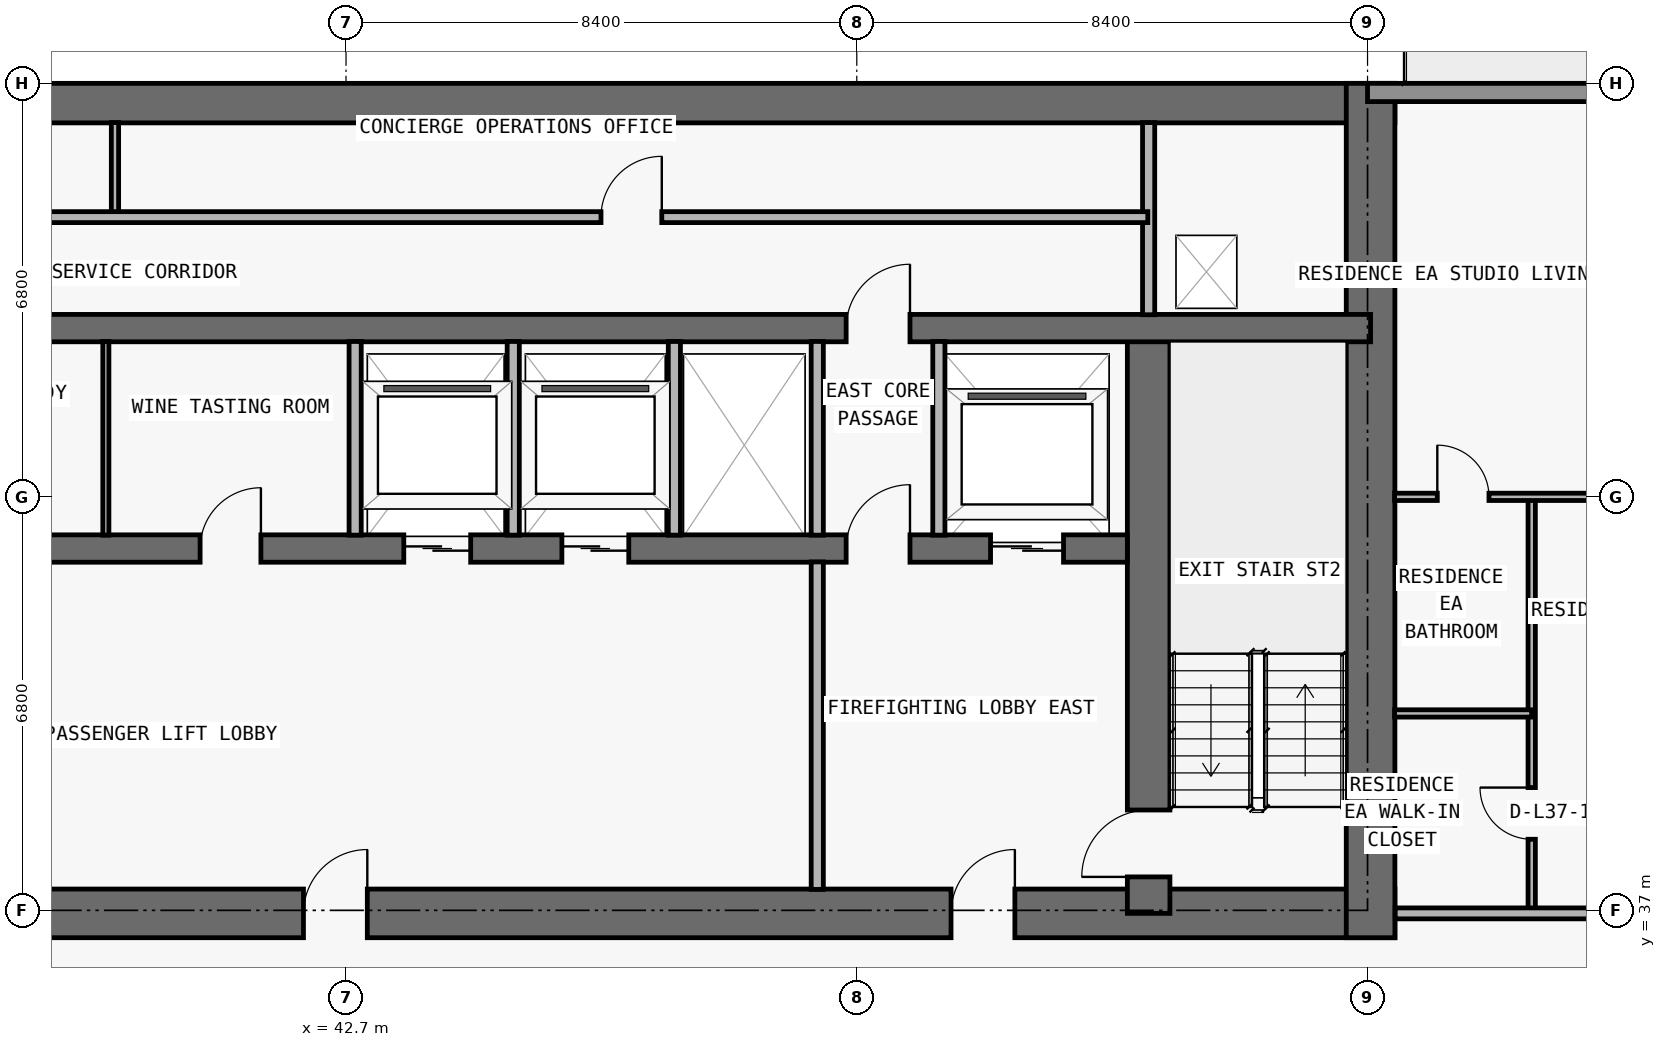
"""IFC4 building model, lengths in metres.
Left out: names, types, materials, properties, quantities, classifications, styles, units other than length and angle.
Written with IfcOpenShell. Run it as: python <this file> out.ifc"""

import sys

from ifc_helpers import new_model, si_unit, direction, frame, frame_2d, origin, place, context, subcontext, project, spatial, rectangle, extrude, element, fill, save


model = new_model("IFC4")
c1 = context("Model", 3, precision=1e-05, world=origin(), true_north=direction((0.0, 1.0)))
c2 = subcontext(c1, "Body", "Model", "MODEL_VIEW")
j1 = project(units=[si_unit("LENGTHUNIT", "METRE"), si_unit("PLANEANGLEUNIT", "RADIAN")], contexts=[c1])
p1 = place(None, origin())
s1 = spatial("IfcSite", under=j1, at=p1, CompositionType="ELEMENT")
p2 = place(p1, origin())
s2 = spatial("IfcBuilding", under=s1, at=p2, CompositionType="ELEMENT")
p3 = place(p2, frame((0.0, 0.0, 135.6)))
s3 = spatial("IfcBuildingStorey", under=s2, at=p3, CompositionType="ELEMENT", Elevation=135.6)
p4 = place(p3, frame((17.85, 36.95, 0.0), z_axis=(0.0, 0.0, 1.0), x_axis=(1.0, 0.0, 0.0)))
e1 = element("IfcWall", 1, at=p4, inside=s3, PredefinedType="SHEAR", context=c2, shape_type="SweptSolid", body=[
    extrude(rectangle(XDim=42.1, YDim=0.8, at=frame_2d((21.05, 0.0))), origin(), (0.0, 0.0, 1.0), 3.05),
])
p5 = place(p4, frame((14.45, 0.0, 0.0)))
e2 = element("IfcOpeningElement", 2, at=p5, cuts=e1, PredefinedType="OPENING", context=c2, shape_type="SweptSolid", body=[
    extrude(rectangle(XDim=1.1, YDim=2.15, at=frame_2d((0.55, 1.075))), frame((0.0, 0.41, 0.0), z_axis=(0.0, -1.0, 0.0), x_axis=(1.0, 0.0, 0.0)), (0.0, 0.0, 1.0), 0.82),
])
p6 = place(p4, frame((6.3, 0.0, 0.0)))
e3 = element("IfcOpeningElement", 3, at=p6, cuts=e1, PredefinedType="OPENING", context=c2, shape_type="SweptSolid", body=[
    extrude(rectangle(XDim=1.05, YDim=2.15, at=frame_2d((0.525, 1.075))), frame((0.0, 0.41, 0.0), z_axis=(0.0, -1.0, 0.0), x_axis=(1.0, 0.0, 0.0)), (0.0, 0.0, 1.0), 0.82),
])
p7 = place(p4, frame((34.8, 0.0, 0.0)))
e4 = element("IfcOpeningElement", 4, at=p7, cuts=e1, PredefinedType="OPENING", context=c2, shape_type="SweptSolid", body=[
    extrude(rectangle(XDim=1.05, YDim=2.15, at=frame_2d((0.525, 1.075))), frame((0.0, 0.41, 0.0), z_axis=(0.0, -1.0, 0.0), x_axis=(1.0, 0.0, 0.0)), (0.0, 0.0, 1.0), 0.82),
])
p8 = place(p4, frame((10.913, 0.0, 0.0)))
e5 = element("IfcOpeningElement", 5, at=p8, cuts=e1, PredefinedType="OPENING", context=c2, shape_type="SweptSolid", body=[
    extrude(rectangle(XDim=1.05, YDim=2.15, at=frame_2d((0.525, 1.075))), frame((0.0, 0.41, 0.0), z_axis=(0.0, -1.0, 0.0), x_axis=(1.0, 0.0, 0.0)), (0.0, 0.0, 1.0), 0.82),
])
p9 = place(p4, frame((24.15, 0.0, 0.0)))
e6 = element("IfcOpeningElement", 6, at=p9, cuts=e1, PredefinedType="OPENING", context=c2, shape_type="SweptSolid", body=[
    extrude(rectangle(XDim=1.05, YDim=2.15, at=frame_2d((0.525, 1.075))), frame((0.0, 0.41, 0.0), z_axis=(0.0, -1.0, 0.0), x_axis=(1.0, 0.0, 0.0)), (0.0, 0.0, 1.0), 0.82),
])
p10 = place(p3, frame((17.85, 50.275, 0.0), z_axis=(0.0, 0.0, 1.0), x_axis=(1.0, 0.0, 0.0)))
e7 = element("IfcWall", 7, at=p10, inside=s3, PredefinedType="SHEAR", context=c2, shape_type="SweptSolid", body=[
    extrude(rectangle(XDim=42.1, YDim=0.65, at=frame_2d((21.05, 0.0))), origin(), (0.0, 0.0, 1.0), 3.05),
])
p11 = place(p3, frame((59.55, 36.55, 0.0), z_axis=(0.0, 0.0, 1.0), x_axis=(0.0, 1.0, 0.0)))
e8 = element("IfcWall", 8, at=p11, inside=s3, PredefinedType="SHEAR", context=c2, shape_type="SweptSolid", body=[
    extrude(rectangle(XDim=14.05, YDim=0.8, at=frame_2d((7.025, 0.0))), origin(), (0.0, 0.0, 1.0), 3.05),
])
p12 = place(p3, frame((55.9, 36.95, 0.0), z_axis=(0.0, 0.0, 1.0), x_axis=(0.0, 1.0, 0.0)))
e9 = element("IfcWall", 9, at=p12, inside=s3, PredefinedType="SHEAR", context=c2, shape_type="SweptSolid", body=[
    extrude(rectangle(XDim=9.625, YDim=0.7, at=frame_2d((4.812, 0.0))), origin(), (0.0, 0.0, 1.0), 3.05),
])
p13 = place(p12, frame((0.6, 0.0, 0.0)))
e10 = element("IfcOpeningElement", 10, at=p13, cuts=e9, PredefinedType="OPENING", context=c2, shape_type="SweptSolid", body=[
    extrude(rectangle(XDim=1.1, YDim=2.15, at=frame_2d((0.55, 1.075))), frame((0.0, 0.36, 0.0), z_axis=(0.0, -1.0, 0.0), x_axis=(1.0, 0.0, 0.0)), (0.0, 0.0, 1.0), 0.72),
])
p14 = place(p3, frame((22.25, 42.95, 0.0), z_axis=(0.0, 0.0, 1.0), x_axis=(1.0, 0.0, 0.0)))
e11 = element("IfcWall", 11, at=p14, inside=s3, PredefinedType="SHEAR", context=c2, shape_type="SweptSolid", body=[
    extrude(rectangle(XDim=33.3, YDim=0.45, at=frame_2d((16.65, 0.0))), origin(), (0.0, 0.0, 1.0), 3.05),
])
p15 = place(p14, frame((1.05, 0.0, 0.0)))
e12 = element("IfcOpeningElement", 12, at=p15, cuts=e11, PredefinedType="OPENING", context=c2, shape_type="SweptSolid", body=[
    extrude(rectangle(XDim=1.2, YDim=2.2, at=frame_2d((0.6, 1.1))), frame((0.0, 0.235, 0.0), z_axis=(0.0, -1.0, 0.0), x_axis=(1.0, 0.0, 0.0)), (0.0, 0.0, 1.0), 0.47),
])
p16 = place(p14, frame((31.05, 0.0, 0.0)))
e13 = element("IfcOpeningElement", 13, at=p16, cuts=e11, PredefinedType="OPENING", context=c2, shape_type="SweptSolid", body=[
    extrude(rectangle(XDim=1.2, YDim=2.2, at=frame_2d((0.6, 1.1))), frame((0.0, 0.235, 0.0), z_axis=(0.0, -1.0, 0.0), x_axis=(1.0, 0.0, 0.0)), (0.0, 0.0, 1.0), 0.47),
])
p17 = place(p14, frame((21.4, 0.0, 0.0)))
e14 = element("IfcOpeningElement", 14, at=p17, cuts=e11, PredefinedType="OPENING", context=c2, shape_type="SweptSolid", body=[
    extrude(rectangle(XDim=1.1, YDim=2.2, at=frame_2d((0.55, 1.1))), frame((0.0, 0.235, 0.0), z_axis=(0.0, -1.0, 0.0), x_axis=(1.0, 0.0, 0.0)), (0.0, 0.0, 1.0), 0.47),
])
p18 = place(p14, frame((24.0, 0.0, 0.0)))
e15 = element("IfcOpeningElement", 15, at=p18, cuts=e11, PredefinedType="OPENING", context=c2, shape_type="SweptSolid", body=[
    extrude(rectangle(XDim=1.1, YDim=2.2, at=frame_2d((0.55, 1.1))), frame((0.0, 0.235, 0.0), z_axis=(0.0, -1.0, 0.0), x_axis=(1.0, 0.0, 0.0)), (0.0, 0.0, 1.0), 0.47),
])
p19 = place(p14, frame((3.625, 0.0, 0.0)))
e16 = element("IfcOpeningElement", 16, at=p19, cuts=e11, PredefinedType="OPENING", context=c2, shape_type="SweptSolid", body=[
    extrude(rectangle(XDim=1.05, YDim=2.15, at=frame_2d((0.525, 1.075))), frame((0.0, 0.235, 0.0), z_axis=(0.0, -1.0, 0.0), x_axis=(1.0, 0.0, 0.0)), (0.0, 0.0, 1.0), 0.47),
])
p20 = place(p14, frame((28.675, 0.0, 0.0)))
e17 = element("IfcOpeningElement", 17, at=p20, cuts=e11, PredefinedType="OPENING", context=c2, shape_type="SweptSolid", body=[
    extrude(rectangle(XDim=1.05, YDim=2.15, at=frame_2d((0.525, 1.075))), frame((0.0, 0.235, 0.0), z_axis=(0.0, -1.0, 0.0), x_axis=(1.0, 0.0, 0.0)), (0.0, 0.0, 1.0), 0.47),
])
p21 = place(p14, frame((13.925, 0.0, 0.0)))
e18 = element("IfcOpeningElement", 18, at=p21, cuts=e11, PredefinedType="OPENING", context=c2, shape_type="SweptSolid", body=[
    extrude(rectangle(XDim=1.0, YDim=2.2, at=frame_2d((0.5, 1.1))), frame((0.0, 0.235, 0.0), z_axis=(0.0, -1.0, 0.0), x_axis=(1.0, 0.0, 0.0)), (0.0, 0.0, 1.0), 0.47),
])
p22 = place(p14, frame((18.05, 0.0, 0.0)))
e19 = element("IfcOpeningElement", 19, at=p22, cuts=e11, PredefinedType="OPENING", context=c2, shape_type="SweptSolid", body=[
    extrude(rectangle(XDim=1.0, YDim=2.2, at=frame_2d((0.5, 1.1))), frame((0.0, 0.235, 0.0), z_axis=(0.0, -1.0, 0.0), x_axis=(1.0, 0.0, 0.0)), (0.0, 0.0, 1.0), 0.47),
])
p23 = place(p3, frame((18.25, 46.575, 0.0), z_axis=(0.0, 0.0, 1.0), x_axis=(1.0, 0.0, 0.0)))
e20 = element("IfcWall", 20, at=p23, inside=s3, PredefinedType="SHEAR", context=c2, shape_type="SweptSolid", body=[
    extrude(rectangle(XDim=41.3, YDim=0.45, at=frame_2d((20.65, 0.0))), origin(), (0.0, 0.0, 1.0), 3.05),
])
p24 = place(p23, frame((7.625, 0.0, 0.0)))
e21 = element("IfcOpeningElement", 21, at=p24, cuts=e20, PredefinedType="OPENING", context=c2, shape_type="SweptSolid", body=[
    extrude(rectangle(XDim=1.05, YDim=2.15, at=frame_2d((0.525, 1.075))), frame((0.0, 0.235, 0.0), z_axis=(0.0, -1.0, 0.0), x_axis=(1.0, 0.0, 0.0)), (0.0, 0.0, 1.0), 0.47),
])
p25 = place(p23, frame((32.675, 0.0, 0.0)))
e22 = element("IfcOpeningElement", 22, at=p25, cuts=e20, PredefinedType="OPENING", context=c2, shape_type="SweptSolid", body=[
    extrude(rectangle(XDim=1.05, YDim=2.15, at=frame_2d((0.525, 1.075))), frame((0.0, 0.235, 0.0), z_axis=(0.0, -1.0, 0.0), x_axis=(1.0, 0.0, 0.0)), (0.0, 0.0, 1.0), 0.47),
])
p26 = place(p3, frame((59.5, 50.45, 0.0), z_axis=(0.0, 0.0, 1.0), x_axis=(1.0, 0.0, 0.0)))
e23 = element("IfcWall", 23, at=p26, inside=s3, PredefinedType="STANDARD", context=c2, shape_type="SweptSolid", body=[
    extrude(rectangle(XDim=10.6, YDim=0.3, at=frame_2d((5.3, 0.0))), origin(), (0.0, 0.0, 1.0), 3.05),
])
p27 = place(p26, frame((4.3, 0.0, 0.0)))
e24 = element("IfcOpeningElement", 24, at=p27, cuts=e23, PredefinedType="OPENING", context=c2, shape_type="SweptSolid", body=[
    extrude(rectangle(XDim=2.0, YDim=2.3, at=frame_2d((1.0, 1.15))), frame((0.0, 0.16, 0.0), z_axis=(0.0, -1.0, 0.0), x_axis=(1.0, 0.0, 0.0)), (0.0, 0.0, 1.0), 0.32),
])
p28 = place(p3, frame((38.75, 43.17, 0.0), z_axis=(0.0, 0.0, 1.0), x_axis=(0.0, 1.0, 0.0)))
e25 = element("IfcWall", 25, at=p28, inside=s3, PredefinedType="MOVABLE", context=c2, shape_type="SweptSolid", body=[
    extrude(rectangle(XDim=3.185, YDim=0.1, at=frame_2d((1.593, 0.0))), origin(), (0.0, 0.0, 1.0), 3.05),
])
p29 = place(p3, frame((38.9, 48.4, 0.0), z_axis=(0.0, 0.0, 1.0), x_axis=(0.0, 1.0, 0.0)))
e26 = element("IfcWall", 26, at=p29, inside=s3, PredefinedType="PARTITIONING", context=c2, shape_type="SweptSolid", body=[
    extrude(rectangle(XDim=1.555, YDim=0.12, at=frame_2d((0.778, 0.0))), origin(), (0.0, 0.0, 1.0), 3.05),
])
for number, where, z_axis, x_axis in (
    (27, (42.85, 43.17, 0.0), (0.0, 0.0, 1.0), (0.0, 1.0, 0.0)),
    (28, (45.45, 43.17, 0.0), (0.0, 0.0, 1.0), (0.0, 1.0, 0.0)),
    (29, (48.1, 43.17, 0.0), (0.0, 0.0, 1.0), (0.0, 1.0, 0.0)),
):
    element("IfcWall", number, at=place(p3, frame(where, z_axis=z_axis, x_axis=x_axis)), inside=s3, PredefinedType="PARTITIONING", context=c2, shape_type="SweptSolid", body=[
        extrude(rectangle(XDim=3.185, YDim=0.2, at=frame_2d((1.593, 0.0))), origin(), (0.0, 0.0, 1.0), 3.05),
    ])
p30 = place(p3, frame((50.45, 37.345, 0.0), z_axis=(0.0, 0.0, 1.0), x_axis=(0.0, 1.0, 0.0)))
e30 = element("IfcWall", 30, at=p30, inside=s3, PredefinedType="PARTITIONING", context=c2, shape_type="SweptSolid", body=[
    extrude(rectangle(XDim=5.385, YDim=0.2, at=frame_2d((2.692, 0.0))), origin(), (0.0, 0.0, 1.0), 3.05),
])
for number, where, z_axis, x_axis in (
    (31, (50.45, 43.17, 0.0), (0.0, 0.0, 1.0), (0.0, 1.0, 0.0)),
    (32, (52.45, 43.17, 0.0), (0.0, 0.0, 1.0), (0.0, 1.0, 0.0)),
):
    element("IfcWall", number, at=place(p3, frame(where, z_axis=z_axis, x_axis=x_axis)), inside=s3, PredefinedType="PARTITIONING", context=c2, shape_type="SweptSolid", body=[
        extrude(rectangle(XDim=3.185, YDim=0.2, at=frame_2d((1.593, 0.0))), origin(), (0.0, 0.0, 1.0), 3.05),
    ])
p31 = place(p3, frame((55.9, 46.795, 0.0), z_axis=(0.0, 0.0, 1.0), x_axis=(0.0, 1.0, 0.0)))
e33 = element("IfcWall", 33, at=p31, inside=s3, PredefinedType="PARTITIONING", context=c2, shape_type="SweptSolid", body=[
    extrude(rectangle(XDim=3.16, YDim=0.2, at=frame_2d((1.58, 0.0))), origin(), (0.0, 0.0, 1.0), 3.05),
])
p32 = place(p3, frame((62.2, 36.95, 0.0), z_axis=(0.0, 0.0, 1.0), x_axis=(0.0, 1.0, 0.0)))
e34 = element("IfcWall", 34, at=p32, inside=s3, PredefinedType="PARTITIONING", context=c2, shape_type="SweptSolid", body=[
    extrude(rectangle(XDim=6.85, YDim=0.12, at=frame_2d((3.425, 0.0))), origin(), (0.0, 0.0, 1.0), 3.05),
])
p33 = place(p32, frame((1.219, 0.0, 0.0)))
e35 = element("IfcOpeningElement", 35, at=p33, cuts=e34, PredefinedType="OPENING", context=c2, shape_type="SweptSolid", body=[
    extrude(rectangle(XDim=0.85, YDim=2.1, at=frame_2d((0.425, 1.05))), frame((0.0, 0.07, 0.0), z_axis=(0.0, -1.0, 0.0), x_axis=(1.0, 0.0, 0.0)), (0.0, 0.0, 1.0), 0.14),
])
p34 = place(p3, frame((59.955, 36.95, 0.0), z_axis=(0.0, 0.0, 1.0), x_axis=(1.0, 0.0, 0.0)))
e36 = element("IfcWall", 36, at=p34, inside=s3, PredefinedType="PARTITIONING", context=c2, shape_type="SweptSolid", body=[
    extrude(rectangle(XDim=10.145, YDim=0.18, at=frame_2d((5.073, 0.0))), origin(), (0.0, 0.0, 1.0), 3.05),
])
p35 = place(p34, frame((3.957, 0.0, 0.0)))
e37 = element("IfcOpeningElement", 37, at=p35, cuts=e36, PredefinedType="OPENING", context=c2, shape_type="SweptSolid", body=[
    extrude(rectangle(XDim=1.0, YDim=2.2, at=frame_2d((0.5, 1.1))), frame((0.0, 0.1, 0.0), z_axis=(0.0, -1.0, 0.0), x_axis=(1.0, 0.0, 0.0)), (0.0, 0.0, 1.0), 0.2),
])
p36 = place(p3, frame((59.945, 40.238, 0.0), z_axis=(0.0, 0.0, 1.0), x_axis=(1.0, 0.0, 0.0)))
e38 = element("IfcWall", 38, at=p36, inside=s3, PredefinedType="PARTITIONING", context=c2, shape_type="SweptSolid", body=[
    extrude(rectangle(XDim=2.255, YDim=0.12, at=frame_2d((1.127, 0.0))), origin(), (0.0, 0.0, 1.0), 3.05),
])
p37 = place(p3, frame((59.945, 43.8, 0.0), z_axis=(0.0, 0.0, 1.0), x_axis=(1.0, 0.0, 0.0)))
e39 = element("IfcWall", 39, at=p37, inside=s3, PredefinedType="PARTITIONING", context=c2, shape_type="SweptSolid", body=[
    extrude(rectangle(XDim=13.66, YDim=0.12, at=frame_2d((6.83, 0.0))), origin(), (0.0, 0.0, 1.0), 2.339),
])
p38 = place(p37, frame((4.017, 0.0, 0.0)))
e40 = element("IfcOpeningElement", 40, at=p38, cuts=e39, PredefinedType="OPENING", context=c2, shape_type="SweptSolid", body=[
    extrude(rectangle(XDim=0.9, YDim=2.15, at=frame_2d((0.45, 1.075))), frame((0.0, 0.07, 0.0), z_axis=(0.0, -1.0, 0.0), x_axis=(1.0, 0.0, 0.0)), (0.0, 0.0, 1.0), 0.14),
])
p39 = place(p37, frame((0.702, 0.0, 0.0)))
e41 = element("IfcOpeningElement", 41, at=p39, cuts=e39, PredefinedType="OPENING", context=c2, shape_type="SweptSolid", body=[
    extrude(rectangle(XDim=0.85, YDim=2.1, at=frame_2d((0.425, 1.05))), frame((0.0, 0.07, 0.0), z_axis=(0.0, -1.0, 0.0), x_axis=(1.0, 0.0, 0.0)), (0.0, 0.0, 1.0), 0.14),
])
p40 = place(p3, frame((21.9, 48.4, 0.0), z_axis=(0.0, 0.0, 1.0), x_axis=(1.0, 0.0, 0.0)))
e42 = element("IfcWall", 42, at=p40, inside=s3, PredefinedType="PARTITIONING", context=c2, shape_type="SweptSolid", body=[
    extrude(rectangle(XDim=33.986, YDim=0.18, at=frame_2d((16.993, 0.0))), origin(), (0.0, 0.0, 1.0), 3.05),
])
p41 = place(p40, frame((8.0, 0.0, 0.0)))
e43 = element("IfcOpeningElement", 43, at=p41, cuts=e42, PredefinedType="OPENING", context=c2, shape_type="SweptSolid", body=[
    extrude(rectangle(XDim=1.0, YDim=2.2, at=frame_2d((0.5, 1.1))), frame((0.0, 0.1, 0.0), z_axis=(0.0, -1.0, 0.0), x_axis=(1.0, 0.0, 0.0)), (0.0, 0.0, 1.0), 0.2),
])
p42 = place(p40, frame((24.993, 0.0, 0.0)))
e44 = element("IfcOpeningElement", 44, at=p42, cuts=e42, PredefinedType="OPENING", context=c2, shape_type="SweptSolid", body=[
    extrude(rectangle(XDim=1.0, YDim=2.2, at=frame_2d((0.5, 1.1))), frame((0.0, 0.1, 0.0), z_axis=(0.0, -1.0, 0.0), x_axis=(1.0, 0.0, 0.0)), (0.0, 0.0, 1.0), 0.2),
])
p43 = place(p16, origin())
e45 = element("IfcDoor", 45, at=p43, inside=s3, OperationType="DOUBLE_DOOR_SLIDING", PredefinedType="DOOR", context=c2, shape_type="SweptSolid", body=[
    extrude(rectangle(XDim=1.2, YDim=2.2, at=frame_2d((0.6, 1.1))), frame((0.0, 0.025, 0.0), z_axis=(0.0, -1.0, 0.0), x_axis=(1.0, 0.0, 0.0)), (0.0, 0.0, 1.0), 0.05),
])
fill(e13, e45)
p44 = place(p17, origin())
e46 = element("IfcDoor", 46, at=p44, inside=s3, OperationType="DOUBLE_DOOR_SLIDING", PredefinedType="DOOR", context=c2, shape_type="SweptSolid", body=[
    extrude(rectangle(XDim=1.1, YDim=2.2, at=frame_2d((0.55, 1.1))), frame((0.0, 0.025, 0.0), z_axis=(0.0, -1.0, 0.0), x_axis=(1.0, 0.0, 0.0)), (0.0, 0.0, 1.0), 0.05),
])
fill(e14, e46)
p45 = place(p18, origin())
e47 = element("IfcDoor", 47, at=p45, inside=s3, OperationType="DOUBLE_DOOR_SLIDING", PredefinedType="DOOR", context=c2, shape_type="SweptSolid", body=[
    extrude(rectangle(XDim=1.1, YDim=2.2, at=frame_2d((0.55, 1.1))), frame((0.0, 0.025, 0.0), z_axis=(0.0, -1.0, 0.0), x_axis=(1.0, 0.0, 0.0)), (0.0, 0.0, 1.0), 0.05),
])
fill(e15, e47)
p46 = place(p7, origin())
e48 = element("IfcDoor", 48, at=p46, inside=s3, OperationType="SINGLE_SWING_RIGHT", PredefinedType="DOOR", context=c2, shape_type="SweptSolid", body=[
    extrude(rectangle(XDim=1.05, YDim=2.15, at=frame_2d((0.525, 1.075))), frame((0.0, 0.025, 0.0), z_axis=(0.0, -1.0, 0.0), x_axis=(1.0, 0.0, 0.0)), (0.0, 0.0, 1.0), 0.05),
])
fill(e4, e48)
p47 = place(p13, origin())
e49 = element("IfcDoor", 49, at=p47, inside=s3, OperationType="SINGLE_SWING_LEFT", PredefinedType="DOOR", context=c2, shape_type="SweptSolid", body=[
    extrude(rectangle(XDim=1.1, YDim=2.15, at=frame_2d((0.55, 1.075))), frame((0.0, 0.025, 0.0), z_axis=(0.0, -1.0, 0.0), x_axis=(1.0, 0.0, 0.0)), (0.0, 0.0, 1.0), 0.05),
])
fill(e10, e49)
p48 = place(p20, origin())
e50 = element("IfcDoor", 50, at=p48, inside=s3, OperationType="SINGLE_SWING_RIGHT", PredefinedType="DOOR", context=c2, shape_type="SweptSolid", body=[
    extrude(rectangle(XDim=1.05, YDim=2.15, at=frame_2d((0.525, 1.075))), frame((0.0, 0.025, 0.0), z_axis=(0.0, -1.0, 0.0), x_axis=(1.0, 0.0, 0.0)), (0.0, 0.0, 1.0), 0.05),
])
fill(e17, e50)
p49 = place(p9, origin())
e51 = element("IfcDoor", 51, at=p49, inside=s3, OperationType="SINGLE_SWING_RIGHT", PredefinedType="DOOR", context=c2, shape_type="SweptSolid", body=[
    extrude(rectangle(XDim=1.05, YDim=2.15, at=frame_2d((0.525, 1.075))), frame((0.0, 0.025, 0.0), z_axis=(0.0, -1.0, 0.0), x_axis=(1.0, 0.0, 0.0)), (0.0, 0.0, 1.0), 0.05),
])
fill(e6, e51)
p50 = place(p22, origin())
e52 = element("IfcDoor", 52, at=p50, inside=s3, OperationType="SINGLE_SWING_RIGHT", PredefinedType="DOOR", context=c2, shape_type="SweptSolid", body=[
    extrude(rectangle(XDim=1.0, YDim=2.2, at=frame_2d((0.5, 1.1))), frame((0.0, 0.025, 0.0), z_axis=(0.0, -1.0, 0.0), x_axis=(1.0, 0.0, 0.0)), (0.0, 0.0, 1.0), 0.05),
])
fill(e19, e52)
p51 = place(p25, origin())
e53 = element("IfcDoor", 53, at=p51, inside=s3, OperationType="SINGLE_SWING_RIGHT", PredefinedType="DOOR", context=c2, shape_type="SweptSolid", body=[
    extrude(rectangle(XDim=1.05, YDim=2.15, at=frame_2d((0.525, 1.075))), frame((0.0, 0.025, 0.0), z_axis=(0.0, -1.0, 0.0), x_axis=(1.0, 0.0, 0.0)), (0.0, 0.0, 1.0), 0.05),
])
fill(e22, e53)
p52 = place(p42, origin())
e54 = element("IfcDoor", 54, at=p52, inside=s3, OperationType="SINGLE_SWING_RIGHT", PredefinedType="DOOR", context=c2, shape_type="SweptSolid", body=[
    extrude(rectangle(XDim=1.0, YDim=2.2, at=frame_2d((0.5, 1.1))), frame((0.0, 0.025, 0.0), z_axis=(0.0, -1.0, 0.0), x_axis=(1.0, 0.0, 0.0)), (0.0, 0.0, 1.0), 0.05),
])
fill(e44, e54)
p53 = place(p33, origin())
e55 = element("IfcDoor", 55, at=p53, inside=s3, OperationType="SINGLE_SWING_RIGHT", PredefinedType="DOOR", context=c2, shape_type="SweptSolid", body=[
    extrude(rectangle(XDim=0.85, YDim=2.1, at=frame_2d((0.425, 1.05))), frame((0.0, 0.025, 0.0), z_axis=(0.0, -1.0, 0.0), x_axis=(1.0, 0.0, 0.0)), (0.0, 0.0, 1.0), 0.05),
])
fill(e35, e55)
p54 = place(p39, origin())
e56 = element("IfcDoor", 56, at=p54, inside=s3, OperationType="SINGLE_SWING_LEFT", PredefinedType="DOOR", context=c2, shape_type="SweptSolid", body=[
    extrude(rectangle(XDim=0.85, YDim=2.1, at=frame_2d((0.425, 1.05))), frame((0.0, 0.025, 0.0), z_axis=(0.0, -1.0, 0.0), x_axis=(1.0, 0.0, 0.0)), (0.0, 0.0, 1.0), 0.05),
])
fill(e41, e56)
save(model, sys.argv[1])
